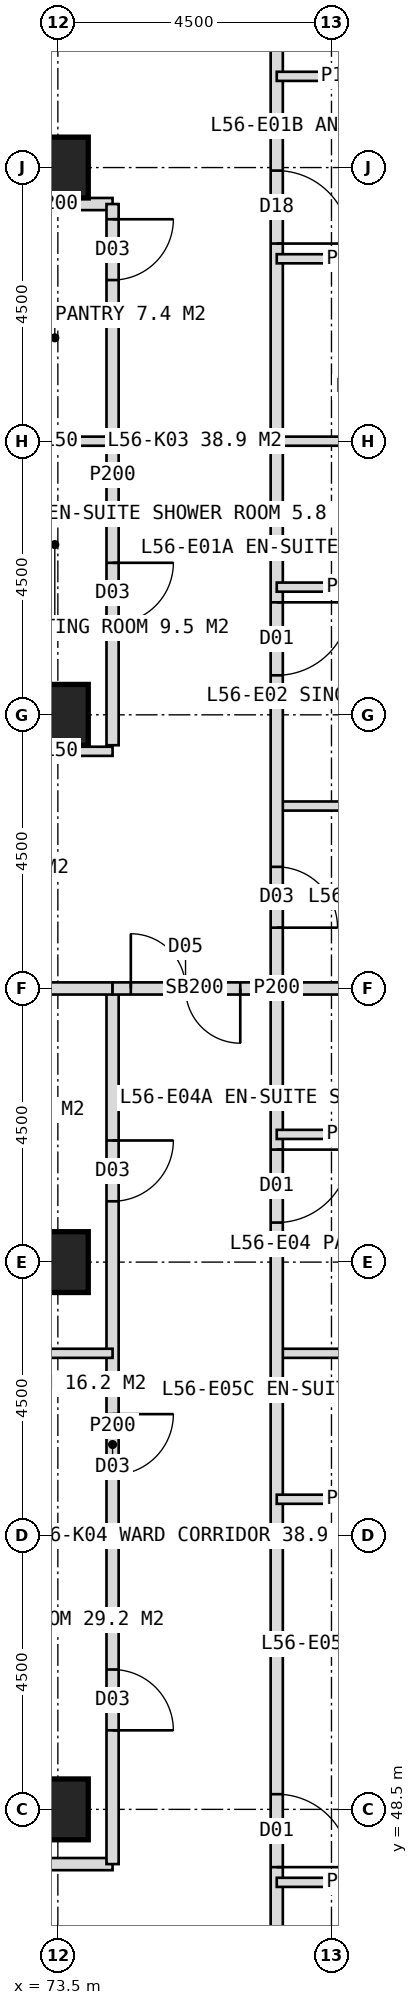
"""IFC4 building model, lengths in metres.
Left out: names, types, materials, properties, quantities, classifications, styles, units other than length and angle.
Written with IfcOpenShell. Run it as: python <this file> out.ifc"""

import sys

from ifc_helpers import new_model, si_unit, direction, frame, frame_2d, origin, origin_2d, place, context, subcontext, project, spatial, rectangle, hollow_rectangle, extrude, element, fill, save


model = new_model("IFC4")
c1 = context("Model", 3, precision=1e-05, world=origin(), true_north=direction((0.0, 1.0)))
c2 = subcontext(c1, "Body", "Model", "MODEL_VIEW")
j1 = project(units=[si_unit("LENGTHUNIT", "METRE"), si_unit("PLANEANGLEUNIT", "RADIAN")], contexts=[c1])
p1 = place(None, origin())
s1 = spatial("IfcSite", under=j1, at=p1, CompositionType="ELEMENT")
p2 = place(p1, origin())
s2 = spatial("IfcBuilding", under=s1, at=p2, CompositionType="ELEMENT")
p3 = place(p2, frame((0.0, 0.0, 233.0)))
s3 = spatial("IfcBuildingStorey", under=s2, at=p3, CompositionType="ELEMENT", Elevation=233.0)
for number, where, z_axis, x_axis in (
    (1, (73.5, 48.5, 0.0), (0.0, 0.0, 1.0), (1.0, 0.0, 0.0)),
    (2, (73.5, 75.5, 0.0), (0.0, 0.0, 1.0), (1.0, 0.0, 0.0)),
    (3, (73.5, 57.5, 0.0), (0.0, 0.0, 1.0), (1.0, 0.0, 0.0)),
    (4, (73.5, 66.5, 0.0), (0.0, 0.0, 1.0), (1.0, 0.0, 0.0)),
):
    element("IfcColumn", number, at=place(p3, frame(where, z_axis=z_axis, x_axis=x_axis)), inside=s3, PredefinedType="COLUMN", context=c2, shape_type="SweptSolid", body=[
        extrude(hollow_rectangle(XDim=1.0, YDim=1.0, WallThickness=0.1, at=origin_2d()), origin(), (0.0, 0.0, 1.0), 4.0),
    ])
p4 = place(p3, frame((72.5, 74.9, 0.0), z_axis=(0.0, 0.0, 1.0), x_axis=(1.0, 0.0, 0.0)))
e5 = element("IfcWall", 5, at=p4, inside=s3, PredefinedType="PARTITIONING", context=c2, shape_type="SweptSolid", body=[
    extrude(rectangle(XDim=1.9, YDim=0.2, at=frame_2d((0.95, 0.0))), origin(), (0.0, 0.0, 1.0), 3.75),
])
p5 = place(p3, frame((74.4, 47.6, 0.0), z_axis=(0.0, 0.0, 1.0), x_axis=(-1.0, 0.0, 0.0)))
e6 = element("IfcWall", 6, at=p5, inside=s3, PredefinedType="PARTITIONING", context=c2, shape_type="SweptSolid", body=[
    extrude(rectangle(XDim=5.4, YDim=0.2, at=frame_2d((2.7, 0.0))), origin(), (0.0, 0.0, 1.0), 3.75),
])
for number, where, z_axis, x_axis in (
    (7, (77.1, 71.0, 0.0), (0.0, 0.0, 1.0), (1.0, 0.0, 0.0)),
    (8, (77.1, 65.0, 0.0), (0.0, 0.0, 1.0), (1.0, 0.0, 0.0)),
):
    element("IfcWall", number, at=place(p3, frame(where, z_axis=z_axis, x_axis=x_axis)), inside=s3, PredefinedType="PARTITIONING", context=c2, shape_type="SweptSolid", body=[
        extrude(rectangle(XDim=5.25, YDim=0.15, at=frame_2d((2.625, 0.0))), origin(), (0.0, 0.0, 1.0), 3.75),
    ])
p6 = place(p3, frame((77.1, 62.0, 0.0), z_axis=(0.0, 0.0, 1.0), x_axis=(1.0, 0.0, 0.0)))
e9 = element("IfcWall", 9, at=p6, inside=s3, PredefinedType="SOLIDWALL", context=c2, shape_type="SweptSolid", body=[
    extrude(rectangle(XDim=5.25, YDim=0.2, at=frame_2d((2.625, 0.0))), origin(), (0.0, 0.0, 1.0), 2.95),
])
p7 = place(p3, frame((77.1, 56.0, 0.0), z_axis=(0.0, 0.0, 1.0), x_axis=(1.0, 0.0, 0.0)))
e10 = element("IfcWall", 10, at=p7, inside=s3, PredefinedType="PARTITIONING", context=c2, shape_type="SweptSolid", body=[
    extrude(rectangle(XDim=5.25, YDim=0.15, at=frame_2d((2.625, 0.0))), origin(), (0.0, 0.0, 1.0), 3.75),
])
p8 = place(p3, frame((77.1, 79.1, 0.0), z_axis=(0.0, 0.0, 1.0), x_axis=(0.0, -1.0, 0.0)))
e11 = element("IfcWall", 11, at=p8, inside=s3, PredefinedType="PARTITIONING", context=c2, shape_type="SweptSolid", body=[
    extrude(rectangle(XDim=34.2, YDim=0.2, at=frame_2d((17.1, 0.0))), origin(), (0.0, 0.0, 1.0), 3.75),
])
p9 = place(p8, frame((3.65, 0.0, 0.0)))
e12 = element("IfcOpeningElement", 12, at=p9, cuts=e11, PredefinedType="OPENING", context=c2, shape_type="SweptSolid", body=[
    extrude(rectangle(XDim=1.2, YDim=2.2, at=frame_2d((0.6, 1.1))), frame((0.0, 0.11, 0.0), z_axis=(0.0, -1.0, 0.0), x_axis=(1.0, 0.0, 0.0)), (0.0, 0.0, 1.0), 0.22),
])
p10 = place(p8, frame((10.75, 0.0, 0.0)))
e13 = element("IfcOpeningElement", 13, at=p10, cuts=e11, PredefinedType="OPENING", context=c2, shape_type="SweptSolid", body=[
    extrude(rectangle(XDim=1.2, YDim=2.2, at=frame_2d((0.6, 1.1))), frame((0.0, 0.11, 0.0), z_axis=(0.0, -1.0, 0.0), x_axis=(1.0, 0.0, 0.0)), (0.0, 0.0, 1.0), 0.22),
])
p11 = place(p8, frame((15.1, 0.0, 0.0)))
e14 = element("IfcOpeningElement", 14, at=p11, cuts=e11, PredefinedType="OPENING", context=c2, shape_type="SweptSolid", body=[
    extrude(rectangle(XDim=1.0, YDim=2.1, at=frame_2d((0.5, 1.05))), frame((0.0, 0.11, 0.0), z_axis=(0.0, -1.0, 0.0), x_axis=(1.0, 0.0, 0.0)), (0.0, 0.0, 1.0), 0.22),
])
p12 = place(p8, frame((19.75, 0.0, 0.0)))
e15 = element("IfcOpeningElement", 15, at=p12, cuts=e11, PredefinedType="OPENING", context=c2, shape_type="SweptSolid", body=[
    extrude(rectangle(XDim=1.2, YDim=2.2, at=frame_2d((0.6, 1.1))), frame((0.0, 0.11, 0.0), z_axis=(0.0, -1.0, 0.0), x_axis=(1.0, 0.0, 0.0)), (0.0, 0.0, 1.0), 0.22),
])
p13 = place(p8, frame((30.35, 0.0, 0.0)))
e16 = element("IfcOpeningElement", 16, at=p13, cuts=e11, PredefinedType="OPENING", context=c2, shape_type="SweptSolid", body=[
    extrude(rectangle(XDim=1.2, YDim=2.2, at=frame_2d((0.6, 1.1))), frame((0.0, 0.11, 0.0), z_axis=(0.0, -1.0, 0.0), x_axis=(1.0, 0.0, 0.0)), (0.0, 0.0, 1.0), 0.22),
])
for number, where, z_axis, x_axis in (
    (17, (77.1, 74.0, 0.0), (0.0, 0.0, 1.0), (1.0, 0.0, 0.0)),
    (18, (77.1, 77.0, 0.0), (0.0, 0.0, 1.0), (1.0, 0.0, 0.0)),
    (19, (77.1, 68.6, 0.0), (0.0, 0.0, 1.0), (1.0, 0.0, 0.0)),
    (20, (77.1, 59.6, 0.0), (0.0, 0.0, 1.0), (1.0, 0.0, 0.0)),
    (21, (77.1, 47.3, 0.0), (0.0, 0.0, 1.0), (1.0, 0.0, 0.0)),
    (22, (77.1, 53.6, 0.0), (0.0, 0.0, 1.0), (1.0, 0.0, 0.0)),
):
    element("IfcWall", number, at=place(p3, frame(where, z_axis=z_axis, x_axis=x_axis)), inside=s3, PredefinedType="PARTITIONING", context=c2, shape_type="SweptSolid", body=[
        extrude(rectangle(XDim=2.4, YDim=0.15, at=frame_2d((1.2, 0.0))), origin(), (0.0, 0.0, 1.0), 3.75),
    ])
p14 = place(p3, frame((72.5, 71.0, 0.0), z_axis=(0.0, 0.0, 1.0), x_axis=(1.0, 0.0, 0.0)))
e23 = element("IfcWall", 23, at=p14, inside=s3, PredefinedType="PARTITIONING", context=c2, shape_type="SweptSolid", body=[
    extrude(rectangle(XDim=1.9, YDim=0.15, at=frame_2d((0.95, 0.0))), origin(), (0.0, 0.0, 1.0), 3.75),
])
p15 = place(p3, frame((74.4, 74.9, 0.0), z_axis=(0.0, 0.0, 1.0), x_axis=(0.0, -1.0, 0.0)))
e24 = element("IfcWall", 24, at=p15, inside=s3, PredefinedType="PARTITIONING", context=c2, shape_type="SweptSolid", body=[
    extrude(rectangle(XDim=8.9, YDim=0.2, at=frame_2d((4.45, 0.0))), origin(), (0.0, 0.0, 1.0), 3.75),
])
p16 = place(p15, frame((0.25, 0.0, 0.0)))
e25 = element("IfcOpeningElement", 25, at=p16, cuts=e24, PredefinedType="OPENING", context=c2, shape_type="SweptSolid", body=[
    extrude(rectangle(XDim=1.0, YDim=2.1, at=frame_2d((0.5, 1.05))), frame((0.0, 0.11, 0.0), z_axis=(0.0, -1.0, 0.0), x_axis=(1.0, 0.0, 0.0)), (0.0, 0.0, 1.0), 0.22),
])
p17 = place(p15, frame((5.9, 0.0, 0.0)))
e26 = element("IfcOpeningElement", 26, at=p17, cuts=e24, PredefinedType="OPENING", context=c2, shape_type="SweptSolid", body=[
    extrude(rectangle(XDim=1.0, YDim=2.1, at=frame_2d((0.5, 1.05))), frame((0.0, 0.11, 0.0), z_axis=(0.0, -1.0, 0.0), x_axis=(1.0, 0.0, 0.0)), (0.0, 0.0, 1.0), 0.22),
])
p18 = place(p3, frame((74.4, 62.0, 0.0), z_axis=(0.0, 0.0, 1.0), x_axis=(0.0, -1.0, 0.0)))
e27 = element("IfcWall", 27, at=p18, inside=s3, PredefinedType="PARTITIONING", context=c2, shape_type="SweptSolid", body=[
    extrude(rectangle(XDim=14.4, YDim=0.2, at=frame_2d((7.2, 0.0))), origin(), (0.0, 0.0, 1.0), 3.75),
])
p19 = place(p18, frame((2.5, 0.0, 0.0)))
e28 = element("IfcOpeningElement", 28, at=p19, cuts=e27, PredefinedType="OPENING", context=c2, shape_type="SweptSolid", body=[
    extrude(rectangle(XDim=1.0, YDim=2.1, at=frame_2d((0.5, 1.05))), frame((0.0, 0.11, 0.0), z_axis=(0.0, -1.0, 0.0), x_axis=(1.0, 0.0, 0.0)), (0.0, 0.0, 1.0), 0.22),
])
p20 = place(p18, frame((7.0, 0.0, 0.0)))
e29 = element("IfcOpeningElement", 29, at=p20, cuts=e27, PredefinedType="OPENING", context=c2, shape_type="SweptSolid", body=[
    extrude(rectangle(XDim=1.0, YDim=2.1, at=frame_2d((0.5, 1.05))), frame((0.0, 0.11, 0.0), z_axis=(0.0, -1.0, 0.0), x_axis=(1.0, 0.0, 0.0)), (0.0, 0.0, 1.0), 0.22),
])
p21 = place(p18, frame((11.2, 0.0, 0.0)))
e30 = element("IfcOpeningElement", 30, at=p21, cuts=e27, PredefinedType="OPENING", context=c2, shape_type="SweptSolid", body=[
    extrude(rectangle(XDim=1.0, YDim=2.1, at=frame_2d((0.5, 1.05))), frame((0.0, 0.11, 0.0), z_axis=(0.0, -1.0, 0.0), x_axis=(1.0, 0.0, 0.0)), (0.0, 0.0, 1.0), 0.22),
])
p22 = place(p3, frame((72.5, 65.9, 0.0), z_axis=(0.0, 0.0, 1.0), x_axis=(1.0, 0.0, 0.0)))
e31 = element("IfcWall", 31, at=p22, inside=s3, PredefinedType="PARTITIONING", context=c2, shape_type="SweptSolid", body=[
    extrude(rectangle(XDim=1.9, YDim=0.15, at=frame_2d((0.95, 0.0))), origin(), (0.0, 0.0, 1.0), 3.75),
])
p23 = place(p3, frame((69.0, 62.0, 0.0), z_axis=(0.0, 0.0, 1.0), x_axis=(1.0, 0.0, 0.0)))
e32 = element("IfcWall", 32, at=p23, inside=s3, PredefinedType="SOLIDWALL", context=c2, shape_type="SweptSolid", body=[
    extrude(rectangle(XDim=5.4, YDim=0.2, at=frame_2d((2.7, 0.0))), origin(), (0.0, 0.0, 1.0), 2.95),
])
for number, where, z_axis, x_axis in (
    (33, (69.0, 56.0, 0.0), (0.0, 0.0, 1.0), (1.0, 0.0, 0.0)),
    (34, (69.0, 53.0, 0.0), (0.0, 0.0, 1.0), (1.0, 0.0, 0.0)),
):
    element("IfcWall", number, at=place(p3, frame(where, z_axis=z_axis, x_axis=x_axis)), inside=s3, PredefinedType="PARTITIONING", context=c2, shape_type="SweptSolid", body=[
        extrude(rectangle(XDim=5.4, YDim=0.15, at=frame_2d((2.7, 0.0))), origin(), (0.0, 0.0, 1.0), 3.75),
    ])
p24 = place(p3, frame((74.4, 62.0, 0.0), z_axis=(0.0, 0.0, 1.0), x_axis=(1.0, 0.0, 0.0)))
e35 = element("IfcWall", 35, at=p24, inside=s3, PredefinedType="SOLIDWALL", context=c2, shape_type="SweptSolid", body=[
    extrude(rectangle(XDim=2.7, YDim=0.2, at=frame_2d((1.35, 0.0))), origin(), (0.0, 0.0, 1.0), 2.95),
])
p25 = place(p24, frame((0.3, 0.0, 0.0)))
e36 = element("IfcOpeningElement", 36, at=p25, cuts=e35, PredefinedType="OPENING", context=c2, shape_type="SweptSolid", body=[
    extrude(rectangle(XDim=1.8, YDim=2.2, at=frame_2d((0.9, 1.1))), frame((0.0, 0.11, 0.0), z_axis=(0.0, -1.0, 0.0), x_axis=(1.0, 0.0, 0.0)), (0.0, 0.0, 1.0), 0.22),
])
p26 = place(p16, origin())
e37 = element("IfcDoor", 37, at=p26, inside=s3, OperationType="SINGLE_SWING_LEFT", PredefinedType="DOOR", context=c2, shape_type="SweptSolid", body=[
    extrude(rectangle(XDim=1.0, YDim=2.1, at=frame_2d((0.5, 1.05))), frame((0.0, 0.025, 0.0), z_axis=(0.0, -1.0, 0.0), x_axis=(1.0, 0.0, 0.0)), (0.0, 0.0, 1.0), 0.05),
])
fill(e25, e37)
p27 = place(p9, origin())
e38 = element("IfcDoor", 38, at=p27, inside=s3, OperationType="SINGLE_SWING_RIGHT", PredefinedType="DOOR", context=c2, shape_type="SweptSolid", body=[
    extrude(rectangle(XDim=1.2, YDim=2.2, at=frame_2d((0.6, 1.1))), frame((0.0, 0.025, 0.0), z_axis=(0.0, -1.0, 0.0), x_axis=(1.0, 0.0, 0.0)), (0.0, 0.0, 1.0), 0.05),
])
fill(e12, e38)
p28 = place(p10, origin())
e39 = element("IfcDoor", 39, at=p28, inside=s3, OperationType="SINGLE_SWING_LEFT", PredefinedType="DOOR", context=c2, shape_type="SweptSolid", body=[
    extrude(rectangle(XDim=1.2, YDim=2.2, at=frame_2d((0.6, 1.1))), frame((0.0, 0.025, 0.0), z_axis=(0.0, -1.0, 0.0), x_axis=(1.0, 0.0, 0.0)), (0.0, 0.0, 1.0), 0.05),
])
fill(e13, e39)
p29 = place(p11, origin())
e40 = element("IfcDoor", 40, at=p29, inside=s3, OperationType="SINGLE_SWING_RIGHT", PredefinedType="DOOR", context=c2, shape_type="SweptSolid", body=[
    extrude(rectangle(XDim=1.0, YDim=2.1, at=frame_2d((0.5, 1.05))), frame((0.0, 0.025, 0.0), z_axis=(0.0, -1.0, 0.0), x_axis=(1.0, 0.0, 0.0)), (0.0, 0.0, 1.0), 0.05),
])
fill(e14, e40)
p30 = place(p12, origin())
e41 = element("IfcDoor", 41, at=p30, inside=s3, OperationType="SINGLE_SWING_LEFT", PredefinedType="DOOR", context=c2, shape_type="SweptSolid", body=[
    extrude(rectangle(XDim=1.2, YDim=2.2, at=frame_2d((0.6, 1.1))), frame((0.0, 0.025, 0.0), z_axis=(0.0, -1.0, 0.0), x_axis=(1.0, 0.0, 0.0)), (0.0, 0.0, 1.0), 0.05),
])
fill(e15, e41)
p31 = place(p13, origin())
e42 = element("IfcDoor", 42, at=p31, inside=s3, OperationType="SINGLE_SWING_RIGHT", PredefinedType="DOOR", context=c2, shape_type="SweptSolid", body=[
    extrude(rectangle(XDim=1.2, YDim=2.2, at=frame_2d((0.6, 1.1))), frame((0.0, 0.025, 0.0), z_axis=(0.0, -1.0, 0.0), x_axis=(1.0, 0.0, 0.0)), (0.0, 0.0, 1.0), 0.05),
])
fill(e16, e42)
p32 = place(p17, origin())
e43 = element("IfcDoor", 43, at=p32, inside=s3, OperationType="SINGLE_SWING_LEFT", PredefinedType="DOOR", context=c2, shape_type="SweptSolid", body=[
    extrude(rectangle(XDim=1.0, YDim=2.1, at=frame_2d((0.5, 1.05))), frame((0.0, 0.025, 0.0), z_axis=(0.0, -1.0, 0.0), x_axis=(1.0, 0.0, 0.0)), (0.0, 0.0, 1.0), 0.05),
])
fill(e26, e43)
p33 = place(p19, origin())
e44 = element("IfcDoor", 44, at=p33, inside=s3, OperationType="SINGLE_SWING_LEFT", PredefinedType="DOOR", context=c2, shape_type="SweptSolid", body=[
    extrude(rectangle(XDim=1.0, YDim=2.1, at=frame_2d((0.5, 1.05))), frame((0.0, 0.025, 0.0), z_axis=(0.0, -1.0, 0.0), x_axis=(1.0, 0.0, 0.0)), (0.0, 0.0, 1.0), 0.05),
])
fill(e28, e44)
p34 = place(p20, origin())
e45 = element("IfcDoor", 45, at=p34, inside=s3, OperationType="SINGLE_SWING_LEFT", PredefinedType="DOOR", context=c2, shape_type="SweptSolid", body=[
    extrude(rectangle(XDim=1.0, YDim=2.1, at=frame_2d((0.5, 1.05))), frame((0.0, 0.025, 0.0), z_axis=(0.0, -1.0, 0.0), x_axis=(1.0, 0.0, 0.0)), (0.0, 0.0, 1.0), 0.05),
])
fill(e29, e45)
p35 = place(p21, origin())
e46 = element("IfcDoor", 46, at=p35, inside=s3, OperationType="SINGLE_SWING_RIGHT", PredefinedType="DOOR", context=c2, shape_type="SweptSolid", body=[
    extrude(rectangle(XDim=1.0, YDim=2.1, at=frame_2d((0.5, 1.05))), frame((0.0, 0.025, 0.0), z_axis=(0.0, -1.0, 0.0), x_axis=(1.0, 0.0, 0.0)), (0.0, 0.0, 1.0), 0.05),
])
fill(e30, e46)
p36 = place(p25, origin())
e47 = element("IfcDoor", 47, at=p36, inside=s3, OperationType="DOUBLE_DOOR_DOUBLE_SWING", PredefinedType="DOOR", context=c2, shape_type="SweptSolid", body=[
    extrude(rectangle(XDim=1.8, YDim=2.2, at=frame_2d((0.9, 1.1))), frame((0.0, 0.025, 0.0), z_axis=(0.0, -1.0, 0.0), x_axis=(1.0, 0.0, 0.0)), (0.0, 0.0, 1.0), 0.05),
])
fill(e36, e47)
save(model, sys.argv[1])
